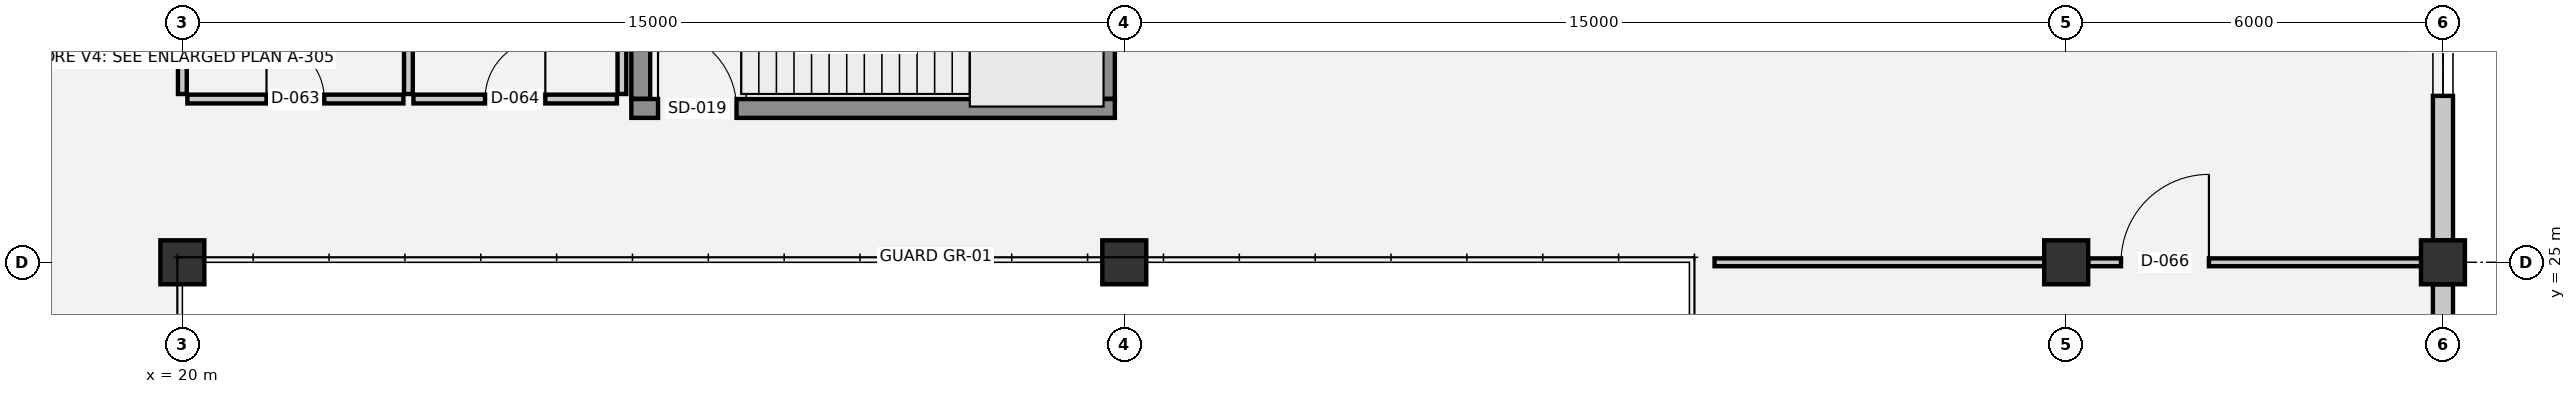
"""IFC4 building model, lengths in metres.
Left out: names, types, materials, properties, quantities, classifications, styles, units other than length and angle.
Written with IfcOpenShell. Run it as: python <this file> out.ifc"""

import sys

from ifc_helpers import new_model, si_unit, direction, frame, frame_2d, origin, origin_2d, place, context, subcontext, project, spatial, rectangle, extrude, element, fill, save


model = new_model("IFC4")
c1 = context("Model", 3, precision=1e-05, world=origin(), true_north=direction((0.0, 1.0)))
c2 = subcontext(c1, "Body", "Model", "MODEL_VIEW")
j1 = project(units=[si_unit("LENGTHUNIT", "METRE"), si_unit("PLANEANGLEUNIT", "RADIAN")], contexts=[c1])
p1 = place(None, origin())
s1 = spatial("IfcSite", under=j1, at=p1, CompositionType="ELEMENT")
p2 = place(p1, origin())
s2 = spatial("IfcBuilding", under=s1, at=p2, CompositionType="ELEMENT")
p3 = place(p2, frame((0.0, 0.0, 5.4)))
s3 = spatial("IfcBuildingStorey", under=s2, at=p3, CompositionType="ELEMENT", Elevation=5.4)
for number, where, z_axis, x_axis in (
    (1, (20.0, 25.0, 0.0), (0.0, 0.0, 1.0), (1.0, 0.0, 0.0)),
    (2, (35.0, 25.0, 0.0), (0.0, 0.0, 1.0), (1.0, 0.0, 0.0)),
    (3, (50.0, 25.0, 0.0), (0.0, 0.0, 1.0), (1.0, 0.0, 0.0)),
    (4, (56.0, 25.0, 0.0), (0.0, 0.0, 1.0), (1.0, 0.0, 0.0)),
):
    element("IfcColumn", number, at=place(p3, frame(where, z_axis=z_axis, x_axis=x_axis)), inside=s3, PredefinedType="COLUMN", context=c2, shape_type="SweptSolid", body=[
        extrude(rectangle(XDim=0.7, YDim=0.7, at=origin_2d()), origin(), (0.0, 0.0, 1.0), 4.5),
    ])
p4 = place(p3, frame((56.0, 31.65, 0.0), z_axis=(0.0, 0.0, 1.0), x_axis=(0.0, -1.0, 0.0)))
e5 = element("IfcWall", 5, at=p4, inside=s3, PredefinedType="SOLIDWALL", context=c2, shape_type="SweptSolid", body=[
    extrude(rectangle(XDim=6.3, YDim=0.32, at=frame_2d((3.15, 0.0))), origin(), (0.0, 0.0, 1.0), 3.26),
])
p5 = place(p4, frame((2.3, 0.0, 0.9)))
e6 = element("IfcOpeningElement", 6, at=p5, cuts=e5, PredefinedType="OPENING", context=c2, shape_type="SweptSolid", body=[
    extrude(rectangle(XDim=1.7, YDim=1.9, at=frame_2d((0.85, 0.95))), frame((0.0, 0.17, 0.0), z_axis=(0.0, -1.0, 0.0), x_axis=(1.0, 0.0, 0.0)), (0.0, 0.0, 1.0), 0.34),
])
p6 = place(p3, frame((56.0, 24.65, 0.0), z_axis=(0.0, 0.0, 1.0), x_axis=(0.0, -1.0, 0.0)))
e7 = element("IfcWall", 7, at=p6, inside=s3, PredefinedType="SOLIDWALL", context=c2, shape_type="SweptSolid", body=[
    extrude(rectangle(XDim=7.3, YDim=0.32, at=frame_2d((3.65, 0.0))), origin(), (0.0, 0.0, 1.0), 3.26),
])
p7 = place(p6, frame((2.8, 0.0, 0.9)))
e8 = element("IfcOpeningElement", 8, at=p7, cuts=e7, PredefinedType="OPENING", context=c2, shape_type="SweptSolid", body=[
    extrude(rectangle(XDim=1.7, YDim=1.9, at=frame_2d((0.85, 0.95))), frame((0.0, 0.17, 0.0), z_axis=(0.0, -1.0, 0.0), x_axis=(1.0, 0.0, 0.0)), (0.0, 0.0, 1.0), 0.34),
])
p8 = place(p3, frame((15.05, 28.325, 0.0), z_axis=(0.0, 0.0, 1.0), x_axis=(1.0, 0.0, 0.0)))
e9 = element("IfcWall", 9, at=p8, inside=s3, PredefinedType="SHEAR", context=c2, shape_type="SweptSolid", body=[
    extrude(rectangle(XDim=2.9, YDim=0.25, at=frame_2d((1.45, 0.0))), origin(), (0.0, 0.0, 1.0), 4.5),
])
p9 = place(p8, frame((0.9, 0.0, 0.0)))
e10 = element("IfcOpeningElement", 10, at=p9, cuts=e9, PredefinedType="OPENING", context=c2, shape_type="SweptSolid", body=[
    extrude(rectangle(XDim=1.1, YDim=2.15, at=frame_2d((0.55, 1.075))), frame((0.0, 0.135, 0.0), z_axis=(0.0, -1.0, 0.0), x_axis=(1.0, 0.0, 0.0)), (0.0, 0.0, 1.0), 0.27),
])
p10 = place(p3, frame((27.15, 27.45, 0.0), z_axis=(0.0, 0.0, 1.0), x_axis=(1.0, 0.0, 0.0)))
e11 = element("IfcWall", 11, at=p10, inside=s3, PredefinedType="SHEAR", context=c2, shape_type="SweptSolid", body=[
    extrude(rectangle(XDim=7.7, YDim=0.3, at=frame_2d((3.85, 0.0))), origin(), (0.0, 0.0, 1.0), 4.24),
])
p11 = place(p10, frame((0.425, 0.0, 0.0)))
e12 = element("IfcOpeningElement", 12, at=p11, cuts=e11, PredefinedType="OPENING", context=c2, shape_type="SweptSolid", body=[
    extrude(rectangle(XDim=1.25, YDim=2.15, at=frame_2d((0.625, 1.075))), frame((0.0, 0.16, 0.0), z_axis=(0.0, -1.0, 0.0), x_axis=(1.0, 0.0, 0.0)), (0.0, 0.0, 1.0), 0.32),
])
for number, where, z_axis, x_axis in (
    (13, (27.3, 31.805, 0.0), (0.0, 0.0, 1.0), (0.0, -1.0, 0.0)),
    (14, (34.7, 27.605, 0.0), (0.0, 0.0, 1.0), (0.0, 1.0, 0.0)),
):
    element("IfcWall", number, at=place(p3, frame(where, z_axis=z_axis, x_axis=x_axis)), inside=s3, PredefinedType="SHEAR", context=c2, shape_type="SweptSolid", body=[
        extrude(rectangle(XDim=4.2, YDim=0.3, at=frame_2d((2.1, 0.0))), origin(), (0.0, 0.0, 1.0), 4.24),
    ])
p12 = place(p3, frame((44.4, 25.0, 0.0), z_axis=(0.0, 0.0, 1.0), x_axis=(1.0, 0.0, 0.0)))
e15 = element("IfcWall", 15, at=p12, inside=s3, PredefinedType="PARTITIONING", context=c2, shape_type="SweptSolid", body=[
    extrude(rectangle(XDim=5.95, YDim=0.125, at=frame_2d((2.975, 0.0))), origin(), (0.0, 0.0, 1.0), 3.28),
])
p13 = place(p3, frame((50.35, 25.0, 0.0), z_axis=(0.0, 0.0, 1.0), x_axis=(1.0, 0.0, 0.0)))
e16 = element("IfcWall", 16, at=p13, inside=s3, PredefinedType="PARTITIONING", context=c2, shape_type="SweptSolid", body=[
    extrude(rectangle(XDim=5.57, YDim=0.125, at=frame_2d((2.785, 0.0))), origin(), (0.0, 0.0, 1.0), 3.53),
])
p14 = place(p13, frame((0.523, 0.0, 0.0)))
e17 = element("IfcOpeningElement", 17, at=p14, cuts=e16, PredefinedType="OPENING", context=c2, shape_type="SweptSolid", body=[
    extrude(rectangle(XDim=1.4, YDim=2.2, at=frame_2d((0.7, 1.1))), frame((0.0, 0.073, 0.0), z_axis=(0.0, -1.0, 0.0), x_axis=(1.0, 0.0, 0.0)), (0.0, 0.0, 1.0), 0.145),
])
p15 = place(p3, frame((20.08, 27.6, 0.0), z_axis=(0.0, 0.0, 1.0), x_axis=(1.0, 0.0, 0.0)))
e18 = element("IfcWall", 18, at=p15, inside=s3, PredefinedType="PLUMBINGWALL", context=c2, shape_type="SweptSolid", body=[
    extrude(rectangle(XDim=3.44, YDim=0.14, at=frame_2d((1.72, 0.0))), origin(), (0.0, 0.0, 1.0), 4.14),
])
p16 = place(p15, frame((1.26, 0.0, 0.0)))
e19 = element("IfcOpeningElement", 19, at=p16, cuts=e18, PredefinedType="OPENING", context=c2, shape_type="SweptSolid", body=[
    extrude(rectangle(XDim=0.92, YDim=2.1, at=frame_2d((0.46, 1.05))), frame((0.0, 0.08, 0.0), z_axis=(0.0, -1.0, 0.0), x_axis=(1.0, 0.0, 0.0)), (0.0, 0.0, 1.0), 0.16),
])
p17 = place(p3, frame((23.68, 27.6, 0.0), z_axis=(0.0, 0.0, 1.0), x_axis=(1.0, 0.0, 0.0)))
e20 = element("IfcWall", 20, at=p17, inside=s3, PredefinedType="PLUMBINGWALL", context=c2, shape_type="SweptSolid", body=[
    extrude(rectangle(XDim=3.24, YDim=0.14, at=frame_2d((1.62, 0.0))), origin(), (0.0, 0.0, 1.0), 4.14),
])
p18 = place(p17, frame((1.14, 0.0, 0.0)))
e21 = element("IfcOpeningElement", 21, at=p18, cuts=e20, PredefinedType="OPENING", context=c2, shape_type="SweptSolid", body=[
    extrude(rectangle(XDim=0.96, YDim=2.1, at=frame_2d((0.48, 1.05))), frame((0.0, 0.08, 0.0), z_axis=(0.0, -1.0, 0.0), x_axis=(1.0, 0.0, 0.0)), (0.0, 0.0, 1.0), 0.16),
])
p19 = place(p3, frame((20.0, 27.68, 0.0), z_axis=(0.0, 0.0, 1.0), x_axis=(0.0, 1.0, 0.0)))
e22 = element("IfcWall", 22, at=p19, inside=s3, PredefinedType="PLUMBINGWALL", context=c2, shape_type="SweptSolid", body=[
    extrude(rectangle(XDim=4.24, YDim=0.14, at=frame_2d((2.12, 0.0))), origin(), (0.0, 0.0, 1.0), 3.68),
])
for number, where, z_axis, x_axis in (
    (23, (23.6, 27.68, 0.0), (0.0, 0.0, 1.0), (0.0, 1.0, 0.0)),
    (24, (27.0, 27.68, 0.0), (0.0, 0.0, 1.0), (0.0, 1.0, 0.0)),
):
    element("IfcWall", number, at=place(p3, frame(where, z_axis=z_axis, x_axis=x_axis)), inside=s3, PredefinedType="PLUMBINGWALL", context=c2, shape_type="SweptSolid", body=[
        extrude(rectangle(XDim=4.24, YDim=0.14, at=frame_2d((2.12, 0.0))), origin(), (0.0, 0.0, 1.0), 4.14),
    ])
p20 = place(p5, origin())
e25 = element("IfcWindow", 25, at=p20, inside=s3, PartitioningType="SINGLE_PANEL", PredefinedType="WINDOW", context=c2, shape_type="SweptSolid", body=[
    extrude(rectangle(XDim=1.7, YDim=1.9, at=frame_2d((0.85, 0.95))), frame((0.0, 0.03, 0.0), z_axis=(0.0, -1.0, 0.0), x_axis=(1.0, 0.0, 0.0)), (0.0, 0.0, 1.0), 0.06),
])
fill(e6, e25)
p21 = place(p11, origin())
e26 = element("IfcDoor", 26, at=p21, inside=s3, OperationType="SINGLE_SWING_LEFT", PredefinedType="DOOR", context=c2, shape_type="SweptSolid", body=[
    extrude(rectangle(XDim=1.25, YDim=2.15, at=frame_2d((0.625, 1.075))), frame((0.0, 0.025, 0.0), z_axis=(0.0, -1.0, 0.0), x_axis=(1.0, 0.0, 0.0)), (0.0, 0.0, 1.0), 0.05),
])
fill(e12, e26)
p22 = place(p16, origin())
e27 = element("IfcDoor", 27, at=p22, inside=s3, OperationType="SINGLE_SWING_LEFT", PredefinedType="DOOR", context=c2, shape_type="SweptSolid", body=[
    extrude(rectangle(XDim=0.92, YDim=2.1, at=frame_2d((0.46, 1.05))), frame((0.0, 0.025, 0.0), z_axis=(0.0, -1.0, 0.0), x_axis=(1.0, 0.0, 0.0)), (0.0, 0.0, 1.0), 0.05),
])
fill(e19, e27)
p23 = place(p18, origin())
e28 = element("IfcDoor", 28, at=p23, inside=s3, OperationType="SINGLE_SWING_RIGHT", PredefinedType="DOOR", context=c2, shape_type="SweptSolid", body=[
    extrude(rectangle(XDim=0.96, YDim=2.1, at=frame_2d((0.48, 1.05))), frame((0.0, 0.025, 0.0), z_axis=(0.0, -1.0, 0.0), x_axis=(1.0, 0.0, 0.0)), (0.0, 0.0, 1.0), 0.05),
])
fill(e21, e28)
p24 = place(p14, origin())
e29 = element("IfcDoor", 29, at=p24, inside=s3, OperationType="SINGLE_SWING_RIGHT", PredefinedType="DOOR", context=c2, shape_type="SweptSolid", body=[
    extrude(rectangle(XDim=1.4, YDim=2.2, at=frame_2d((0.7, 1.1))), frame((0.0, 0.025, 0.0), z_axis=(0.0, -1.0, 0.0), x_axis=(1.0, 0.0, 0.0)), (0.0, 0.0, 1.0), 0.05),
])
fill(e17, e29)
save(model, sys.argv[1])
